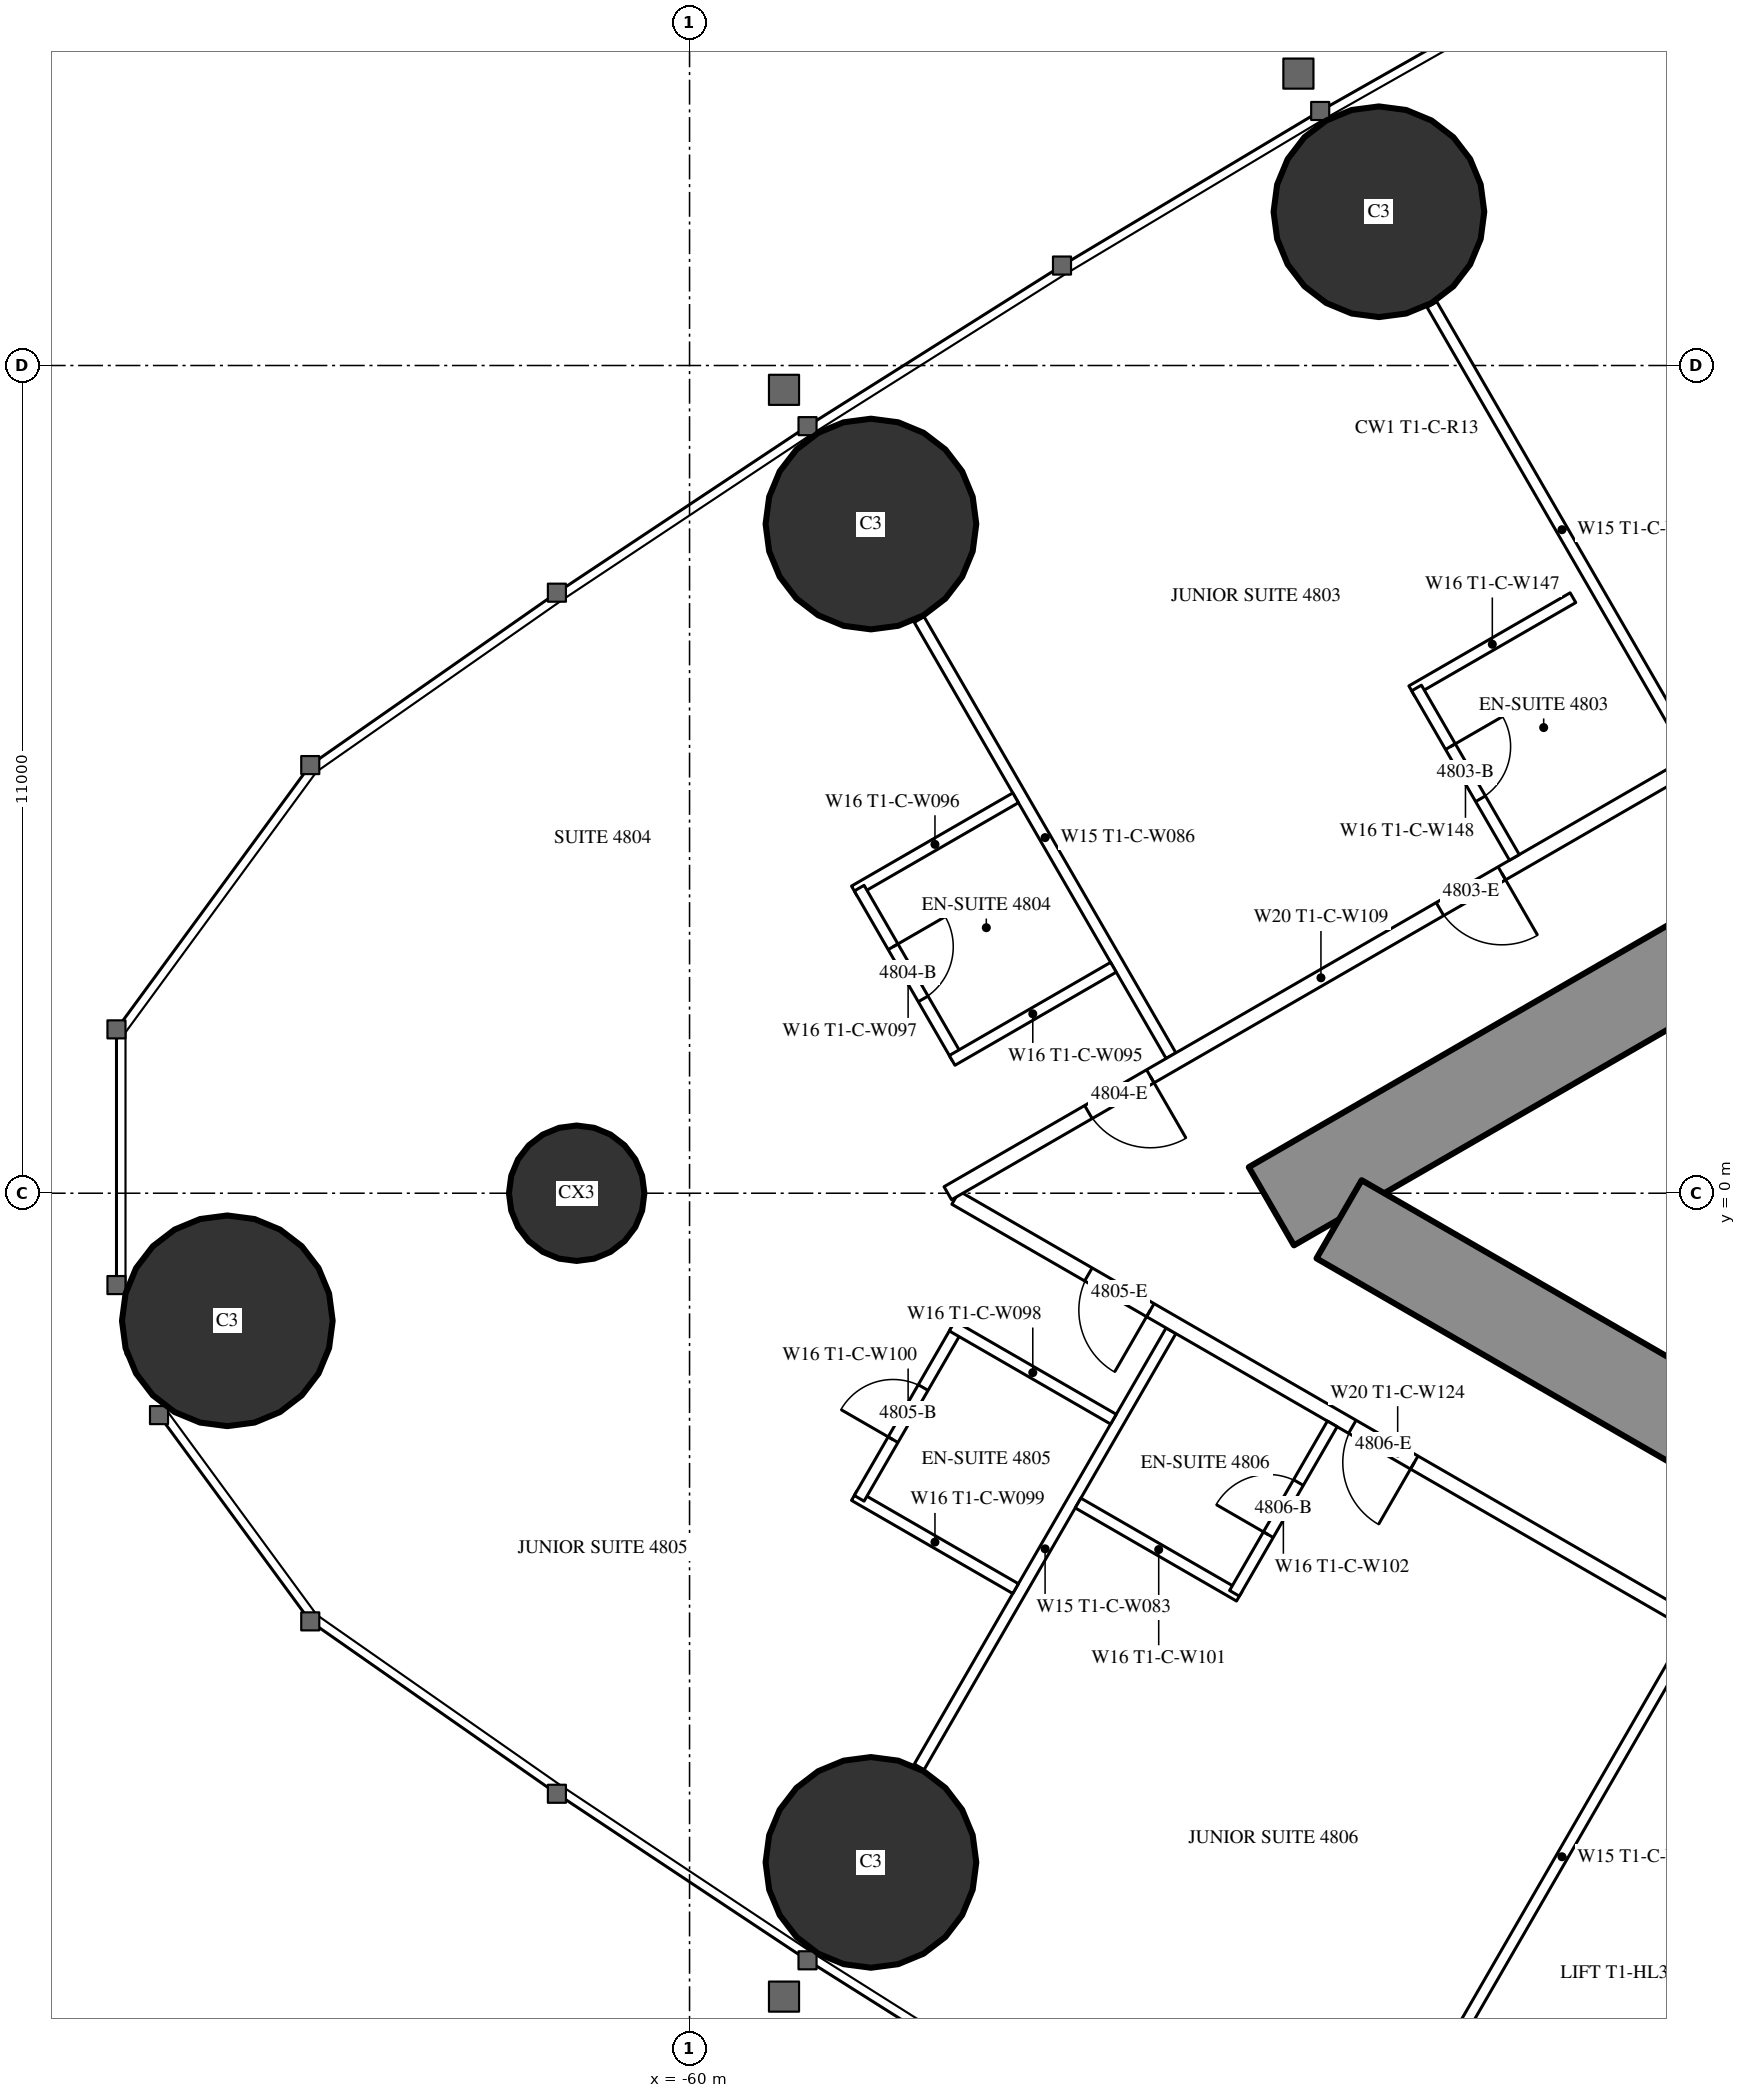
"""IFC4 building model, lengths in metres.
Left out: names, types, materials, properties, quantities, classifications, styles, units other than length and angle.
Written with IfcOpenShell. Run it as: python <this file> out.ifc"""

import sys

from ifc_helpers import new_model, si_unit, direction, frame, frame_2d, origin, origin_2d, place, context, subcontext, project, spatial, rectangle, circle, extrude, element, fill, save


model = new_model("IFC4")
c1 = context("Model", 3, precision=1e-05, world=origin(), true_north=direction((0.0, 1.0)))
c2 = subcontext(c1, "Body", "Model", "MODEL_VIEW")
j1 = project(units=[si_unit("LENGTHUNIT", "METRE"), si_unit("PLANEANGLEUNIT", "RADIAN")], contexts=[c1])
p1 = place(None, origin())
s1 = spatial("IfcSite", under=j1, at=p1, CompositionType="ELEMENT")
p2 = place(p1, origin())
s2 = spatial("IfcBuilding", under=s1, at=p2, CompositionType="ELEMENT")
p3 = place(p2, frame((0.0, 0.0, 180.8)))
s3 = spatial("IfcBuildingStorey", under=s2, at=p3, CompositionType="ELEMENT", Elevation=180.8)
for number, where, z_axis, x_axis in (
    (1, (-66.143, -1.695, 0.0), (0.0, 0.0, 1.0), (1.0, 0.0, 0.0)),
    (2, (-57.59, -8.893, 0.0), (0.0, 0.0, 1.0), (1.0, 0.0, 0.0)),
    (3, (-50.839, 13.043, 0.0), (0.0, 0.0, 1.0), (1.0, 0.0, 0.0)),
    (4, (-57.59, 8.893, 0.0), (0.0, 0.0, 1.0), (1.0, 0.0, 0.0)),
):
    element("IfcColumn", number, at=place(p3, frame(where, z_axis=z_axis, x_axis=x_axis)), inside=s3, PredefinedType="COLUMN", context=c2, shape_type="SweptSolid", body=[
        extrude(circle(Radius=1.4, at=origin_2d()), origin(), (0.0, 0.0, 1.0), 3.5),
    ])
p4 = place(p3, frame((-61.5, 0.0, 0.0), z_axis=(0.0, 0.0, 1.0), x_axis=(1.0, 0.0, 0.0)))
e5 = element("IfcColumn", 5, at=p4, inside=s3, PredefinedType="COLUMN", context=c2, shape_type="SweptSolid", body=[
    extrude(circle(Radius=0.9, at=origin_2d()), origin(), (0.0, 0.0, 1.0), 3.5),
])
p5 = place(p3, frame((-27.2, 14.3, 0.0), z_axis=(0.0, 0.0, 1.0), x_axis=(-0.866026593062, -0.499997940104, 0.0)))
e6 = element("IfcWall", 6, at=p5, inside=s3, PredefinedType="SHEAR", context=c2, shape_type="SweptSolid", body=[
    extrude(rectangle(XDim=28.946, YDim=1.2, at=frame_2d((14.473, 0.0))), origin(), (0.0, 0.0, 1.0), 3.5),
])
p6 = place(p5, frame((4.6, 0.0, 0.0)))
e7 = element("IfcOpeningElement", 7, at=p6, cuts=e6, PredefinedType="OPENING", context=c2, shape_type="SweptSolid", body=[
    extrude(rectangle(XDim=1.0, YDim=2.2, at=frame_2d((0.5, 1.1))), frame((0.0, 0.61, 0.0), z_axis=(0.0, -1.0, 0.0), x_axis=(1.0, 0.0, 0.0)), (0.0, 0.0, 1.0), 1.22),
])
p7 = place(p5, frame((13.395, 0.0, 0.0)))
e8 = element("IfcOpeningElement", 8, at=p7, cuts=e6, PredefinedType="OPENING", context=c2, shape_type="SweptSolid", body=[
    extrude(rectangle(XDim=1.8, YDim=2.2, at=frame_2d((0.9, 1.1))), frame((0.0, 0.61, 0.0), z_axis=(0.0, -1.0, 0.0), x_axis=(1.0, 0.0, 0.0)), (0.0, 0.0, 1.0), 1.22),
])
p8 = place(p3, frame((-27.2, -14.3, 0.0), z_axis=(0.0, 0.0, 1.0), x_axis=(-0.866024021859, 0.500002393557, 0.0)))
e9 = element("IfcWall", 9, at=p8, inside=s3, PredefinedType="SHEAR", context=c2, shape_type="SweptSolid", body=[
    extrude(rectangle(XDim=27.907, YDim=1.2, at=frame_2d((13.954, 0.0))), origin(), (0.0, 0.0, 1.0), 3.5),
])
p9 = place(p8, frame((4.6, 0.0, 0.0)))
e10 = element("IfcOpeningElement", 10, at=p9, cuts=e9, PredefinedType="OPENING", context=c2, shape_type="SweptSolid", body=[
    extrude(rectangle(XDim=1.0, YDim=2.2, at=frame_2d((0.5, 1.1))), frame((0.0, 0.61, 0.0), z_axis=(0.0, -1.0, 0.0), x_axis=(1.0, 0.0, 0.0)), (0.0, 0.0, 1.0), 1.22),
])
p10 = place(p8, frame((13.395, 0.0, 0.0)))
e11 = element("IfcOpeningElement", 11, at=p10, cuts=e9, PredefinedType="OPENING", context=c2, shape_type="SweptSolid", body=[
    extrude(rectangle(XDim=1.8, YDim=2.2, at=frame_2d((0.9, 1.1))), frame((0.0, 0.61, 0.0), z_axis=(0.0, -1.0, 0.0), x_axis=(1.0, 0.0, 0.0)), (0.0, 0.0, 1.0), 1.22),
])
p11 = place(p3, frame((-46.679, 5.825, 0.0), z_axis=(0.0, 0.0, 1.0), x_axis=(-0.500006839597, 0.866021454905, 0.0)))
e12 = element("IfcWall", 12, at=p11, inside=s3, PredefinedType="PARTITIONING", context=c2, shape_type="SweptSolid", body=[
    extrude(rectangle(XDim=6.911, YDim=0.15, at=frame_2d((3.456, 0.0))), origin(), (0.0, 0.0, 1.0), 2.3),
])
p12 = place(p3, frame((-53.602, 1.828, 0.0), z_axis=(0.0, 0.0, 1.0), x_axis=(-0.49999191814, 0.866030069798, 0.0)))
e13 = element("IfcWall", 13, at=p12, inside=s3, PredefinedType="PARTITIONING", context=c2, shape_type="SweptSolid", body=[
    extrude(rectangle(XDim=6.692, YDim=0.15, at=frame_2d((3.346, 0.0))), origin(), (0.0, 0.0, 1.0), 2.3),
])
p13 = place(p3, frame((-46.679, -5.825, 0.0), z_axis=(0.0, 0.0, 1.0), x_axis=(-0.500006839597, -0.866021454905, 0.0)))
e14 = element("IfcWall", 14, at=p13, inside=s3, PredefinedType="PARTITIONING", context=c2, shape_type="SweptSolid", body=[
    extrude(rectangle(XDim=6.911, YDim=0.15, at=frame_2d((3.456, 0.0))), origin(), (0.0, 0.0, 1.0), 2.3),
])
p14 = place(p3, frame((-53.602, -1.828, 0.0), z_axis=(0.0, 0.0, 1.0), x_axis=(-0.49999191814, -0.866030069798, 0.0)))
e15 = element("IfcWall", 15, at=p14, inside=s3, PredefinedType="PARTITIONING", context=c2, shape_type="SweptSolid", body=[
    extrude(rectangle(XDim=6.692, YDim=0.15, at=frame_2d((3.346, 0.0))), origin(), (0.0, 0.0, 1.0), 2.3),
])
p15 = place(p3, frame((-44.715, -6.844, 0.0), z_axis=(0.0, 0.0, 1.0), x_axis=(-0.866025261224, 0.500000246922, 0.0)))
e16 = element("IfcWall", 16, at=p15, inside=s3, PredefinedType="PARTITIONING", context=c2, shape_type="SweptSolid", body=[
    extrude(rectangle(XDim=13.567, YDim=0.2, at=frame_2d((6.783, 0.0))), origin(), (0.0, 0.0, 1.0), 3.25),
])
p16 = place(p15, frame((10.579, 0.0, 0.0)))
e17 = element("IfcOpeningElement", 17, at=p16, cuts=e16, PredefinedType="OPENING", context=c2, shape_type="SweptSolid", body=[
    extrude(rectangle(XDim=0.95, YDim=2.2, at=frame_2d((0.475, 1.1))), frame((0.0, 0.11, 0.0), z_axis=(0.0, -1.0, 0.0), x_axis=(1.0, 0.0, 0.0)), (0.0, 0.0, 1.0), 0.22),
])
p17 = place(p15, frame((6.529, 0.0, 0.0)))
e18 = element("IfcOpeningElement", 18, at=p17, cuts=e16, PredefinedType="OPENING", context=c2, shape_type="SweptSolid", body=[
    extrude(rectangle(XDim=0.95, YDim=2.2, at=frame_2d((0.475, 1.1))), frame((0.0, 0.11, 0.0), z_axis=(0.0, -1.0, 0.0), x_axis=(1.0, 0.0, 0.0)), (0.0, 0.0, 1.0), 0.22),
])
p18 = place(p15, frame((0.5, 0.0, 0.0)))
e19 = element("IfcOpeningElement", 19, at=p18, cuts=e16, PredefinedType="OPENING", context=c2, shape_type="SweptSolid", body=[
    extrude(rectangle(XDim=1.435, YDim=2.2, at=frame_2d((0.718, 1.1))), frame((0.0, 0.11, 0.0), z_axis=(0.0, -1.0, 0.0), x_axis=(1.0, 0.0, 0.0)), (0.0, 0.0, 1.0), 0.22),
])
p19 = place(p3, frame((-46.65, 5.726, 0.0), z_axis=(0.0, 0.0, 1.0), x_axis=(-0.866027963864, -0.499995565786, 0.0)))
e20 = element("IfcWall", 20, at=p19, inside=s3, PredefinedType="PARTITIONING", context=c2, shape_type="SweptSolid", body=[
    extrude(rectangle(XDim=11.452, YDim=0.2, at=frame_2d((5.726, 0.0))), origin(), (0.0, 0.0, 1.0), 3.25),
])
p20 = place(p19, frame((2.95, 0.0, 0.0)))
e21 = element("IfcOpeningElement", 21, at=p20, cuts=e20, PredefinedType="OPENING", context=c2, shape_type="SweptSolid", body=[
    extrude(rectangle(XDim=0.95, YDim=2.2, at=frame_2d((0.475, 1.1))), frame((0.0, 0.11, 0.0), z_axis=(0.0, -1.0, 0.0), x_axis=(1.0, 0.0, 0.0)), (0.0, 0.0, 1.0), 0.22),
])
p21 = place(p19, frame((8.344, 0.0, 0.0)))
e22 = element("IfcOpeningElement", 22, at=p21, cuts=e20, PredefinedType="OPENING", context=c2, shape_type="SweptSolid", body=[
    extrude(rectangle(XDim=0.95, YDim=2.2, at=frame_2d((0.475, 1.1))), frame((0.0, 0.11, 0.0), z_axis=(0.0, -1.0, 0.0), x_axis=(1.0, 0.0, 0.0)), (0.0, 0.0, 1.0), 0.22),
])
p22 = place(p3, frame((-48.26, 7.914, 0.0), z_axis=(0.0, 0.0, 1.0), x_axis=(-0.866031185235, -0.4999899861, 0.0)))
e23 = element("IfcWall", 23, at=p22, inside=s3, PredefinedType="PARTITIONING", context=c2, shape_type="SweptSolid", body=[
    extrude(rectangle(XDim=2.475, YDim=0.15, at=frame_2d((1.238, 0.0))), origin(), (0.0, 0.0, 1.0), 3.25),
])
p23 = place(p3, frame((-49.039, 4.463, 0.0), z_axis=(0.0, 0.0, 1.0), x_axis=(-0.499936506574, 0.866062058628, 0.0)))
e24 = element("IfcWall", 24, at=p23, inside=s3, PredefinedType="PARTITIONING", context=c2, shape_type="SweptSolid", body=[
    extrude(rectangle(XDim=2.6, YDim=0.15, at=frame_2d((1.3, 0.0))), origin(), (0.0, 0.0, 1.0), 3.25),
])
p24 = place(p23, frame((0.9, 0.0, 0.0)))
e25 = element("IfcOpeningElement", 25, at=p24, cuts=e24, PredefinedType="OPENING", context=c2, shape_type="SweptSolid", body=[
    extrude(rectangle(XDim=0.8, YDim=2.2, at=frame_2d((0.4, 1.1))), frame((0.0, 0.085, 0.0), z_axis=(0.0, -1.0, 0.0), x_axis=(1.0, 0.0, 0.0)), (0.0, 0.0, 1.0), 0.17),
])
p25 = place(p3, frame((-55.667, 5.255, 0.0), z_axis=(0.0, 0.0, 1.0), x_axis=(-0.866006523861, -0.500032699561, 0.0)))
e26 = element("IfcWall", 26, at=p25, inside=s3, PredefinedType="PARTITIONING", context=c2, shape_type="SweptSolid", body=[
    extrude(rectangle(XDim=2.475, YDim=0.15, at=frame_2d((1.237, 0.0))), origin(), (0.0, 0.0, 1.0), 3.25),
])
p26 = place(p3, frame((-56.446, 1.803, 0.0), z_axis=(0.0, 0.0, 1.0), x_axis=(-0.499936506574, 0.866062058628, 0.0)))
e27 = element("IfcWall", 27, at=p26, inside=s3, PredefinedType="PARTITIONING", context=c2, shape_type="SweptSolid", body=[
    extrude(rectangle(XDim=2.6, YDim=0.15, at=frame_2d((1.3, 0.0))), origin(), (0.0, 0.0, 1.0), 3.25),
])
p27 = place(p26, frame((0.9, 0.0, 0.0)))
e28 = element("IfcOpeningElement", 28, at=p27, cuts=e27, PredefinedType="OPENING", context=c2, shape_type="SweptSolid", body=[
    extrude(rectangle(XDim=0.8, YDim=2.2, at=frame_2d((0.4, 1.1))), frame((0.0, 0.085, 0.0), z_axis=(0.0, -1.0, 0.0), x_axis=(1.0, 0.0, 0.0)), (0.0, 0.0, 1.0), 0.17),
])
p28 = place(p3, frame((-54.367, 3.003, 0.0), z_axis=(0.0, 0.0, 1.0), x_axis=(-0.866031185235, -0.4999899861, 0.0)))
e29 = element("IfcWall", 29, at=p28, inside=s3, PredefinedType="PARTITIONING", context=c2, shape_type="SweptSolid", body=[
    extrude(rectangle(XDim=2.475, YDim=0.15, at=frame_2d((1.238, 0.0))), origin(), (0.0, 0.0, 1.0), 3.25),
])
p29 = place(p3, frame((-55.667, -5.255, 0.0), z_axis=(0.0, 0.0, 1.0), x_axis=(-0.866006523861, 0.500032699561, 0.0)))
e30 = element("IfcWall", 30, at=p29, inside=s3, PredefinedType="PARTITIONING", context=c2, shape_type="SweptSolid", body=[
    extrude(rectangle(XDim=2.475, YDim=0.15, at=frame_2d((1.237, 0.0))), origin(), (0.0, 0.0, 1.0), 3.25),
])
p30 = place(p3, frame((-56.446, -1.803, 0.0), z_axis=(0.0, 0.0, 1.0), x_axis=(-0.499936506574, -0.866062058628, 0.0)))
e31 = element("IfcWall", 31, at=p30, inside=s3, PredefinedType="PARTITIONING", context=c2, shape_type="SweptSolid", body=[
    extrude(rectangle(XDim=2.6, YDim=0.15, at=frame_2d((1.3, 0.0))), origin(), (0.0, 0.0, 1.0), 3.25),
])
p31 = place(p30, frame((0.9, 0.0, 0.0)))
e32 = element("IfcOpeningElement", 32, at=p31, cuts=e31, PredefinedType="OPENING", context=c2, shape_type="SweptSolid", body=[
    extrude(rectangle(XDim=0.8, YDim=2.2, at=frame_2d((0.4, 1.1))), frame((0.0, 0.085, 0.0), z_axis=(0.0, -1.0, 0.0), x_axis=(1.0, 0.0, 0.0)), (0.0, 0.0, 1.0), 0.17),
])
for number, where, z_axis, x_axis in (
    (33, (-54.367, -3.003, 0.0), (0.0, 0.0, 1.0), (-0.866, 0.5, 0.0)),
    (34, (-52.694, -5.355, 0.0), (0.0, 0.0, 1.0), (-0.866, 0.5, 0.0)),
):
    element("IfcWall", number, at=place(p3, frame(where, z_axis=z_axis, x_axis=x_axis)), inside=s3, PredefinedType="PARTITIONING", context=c2, shape_type="SweptSolid", body=[
        extrude(rectangle(XDim=2.475, YDim=0.15, at=frame_2d((1.238, 0.0))), origin(), (0.0, 0.0, 1.0), 3.25),
    ])
p32 = place(p3, frame((-51.459, -3.065, 0.0), z_axis=(0.0, 0.0, 1.0), x_axis=(-0.499936506574, -0.866062058628, 0.0)))
e35 = element("IfcWall", 35, at=p32, inside=s3, PredefinedType="PARTITIONING", context=c2, shape_type="SweptSolid", body=[
    extrude(rectangle(XDim=2.6, YDim=0.15, at=frame_2d((1.3, 0.0))), origin(), (0.0, 0.0, 1.0), 3.25),
])
p33 = place(p32, frame((0.9, 0.0, 0.0)))
e36 = element("IfcOpeningElement", 36, at=p33, cuts=e35, PredefinedType="OPENING", context=c2, shape_type="SweptSolid", body=[
    extrude(rectangle(XDim=0.8, YDim=2.2, at=frame_2d((0.4, 1.1))), frame((0.0, 0.085, 0.0), z_axis=(0.0, -1.0, 0.0), x_axis=(1.0, 0.0, 0.0)), (0.0, 0.0, 1.0), 0.17),
])
p34 = place(p3, frame((-45.428, -8.568, 0.0), z_axis=(0.0, 0.0, 1.0), x_axis=(-0.499929347863, -0.866066190972, 0.0)))
e37 = element("IfcWall", 37, at=p34, inside=s3, PredefinedType="PARTITIONING", context=c2, shape_type="SweptSolid", body=[
    extrude(rectangle(XDim=3.201, YDim=0.25, at=frame_2d((1.6, 0.0))), origin(), (0.0, 0.0, 1.0), 3.25),
])
p35 = place(p24, origin())
e38 = element("IfcDoor", 38, at=p35, inside=s3, OperationType="SINGLE_SWING_RIGHT", PredefinedType="DOOR", context=c2, shape_type="SweptSolid", body=[
    extrude(rectangle(XDim=0.8, YDim=2.2, at=frame_2d((0.4, 1.1))), frame((0.0, 0.025, 0.0), z_axis=(0.0, -1.0, 0.0), x_axis=(1.0, 0.0, 0.0)), (0.0, 0.0, 1.0), 0.05),
])
fill(e25, e38)
p36 = place(p20, origin())
e39 = element("IfcDoor", 39, at=p36, inside=s3, OperationType="SINGLE_SWING_LEFT", PredefinedType="DOOR", context=c2, shape_type="SweptSolid", body=[
    extrude(rectangle(XDim=0.95, YDim=2.2, at=frame_2d((0.475, 1.1))), frame((0.0, 0.025, 0.0), z_axis=(0.0, -1.0, 0.0), x_axis=(1.0, 0.0, 0.0)), (0.0, 0.0, 1.0), 0.05),
])
fill(e21, e39)
p37 = place(p27, origin())
e40 = element("IfcDoor", 40, at=p37, inside=s3, OperationType="SINGLE_SWING_RIGHT", PredefinedType="DOOR", context=c2, shape_type="SweptSolid", body=[
    extrude(rectangle(XDim=0.8, YDim=2.2, at=frame_2d((0.4, 1.1))), frame((0.0, 0.025, 0.0), z_axis=(0.0, -1.0, 0.0), x_axis=(1.0, 0.0, 0.0)), (0.0, 0.0, 1.0), 0.05),
])
fill(e28, e40)
p38 = place(p21, origin())
e41 = element("IfcDoor", 41, at=p38, inside=s3, OperationType="SINGLE_SWING_LEFT", PredefinedType="DOOR", context=c2, shape_type="SweptSolid", body=[
    extrude(rectangle(XDim=0.95, YDim=2.2, at=frame_2d((0.475, 1.1))), frame((0.0, 0.025, 0.0), z_axis=(0.0, -1.0, 0.0), x_axis=(1.0, 0.0, 0.0)), (0.0, 0.0, 1.0), 0.05),
])
fill(e22, e41)
p39 = place(p31, origin())
e42 = element("IfcDoor", 42, at=p39, inside=s3, OperationType="SINGLE_SWING_RIGHT", PredefinedType="DOOR", context=c2, shape_type="SweptSolid", body=[
    extrude(rectangle(XDim=0.8, YDim=2.2, at=frame_2d((0.4, 1.1))), frame((0.0, 0.025, 0.0), z_axis=(0.0, -1.0, 0.0), x_axis=(1.0, 0.0, 0.0)), (0.0, 0.0, 1.0), 0.05),
])
fill(e32, e42)
p40 = place(p16, origin())
e43 = element("IfcDoor", 43, at=p40, inside=s3, OperationType="SINGLE_SWING_LEFT", PredefinedType="DOOR", context=c2, shape_type="SweptSolid", body=[
    extrude(rectangle(XDim=0.95, YDim=2.2, at=frame_2d((0.475, 1.1))), frame((0.0, 0.025, 0.0), z_axis=(0.0, -1.0, 0.0), x_axis=(1.0, 0.0, 0.0)), (0.0, 0.0, 1.0), 0.05),
])
fill(e17, e43)
p41 = place(p33, origin())
e44 = element("IfcDoor", 44, at=p41, inside=s3, OperationType="SINGLE_SWING_RIGHT", PredefinedType="DOOR", context=c2, shape_type="SweptSolid", body=[
    extrude(rectangle(XDim=0.8, YDim=2.2, at=frame_2d((0.4, 1.1))), frame((0.0, 0.025, 0.0), z_axis=(0.0, -1.0, 0.0), x_axis=(1.0, 0.0, 0.0)), (0.0, 0.0, 1.0), 0.05),
])
fill(e36, e44)
p42 = place(p17, origin())
e45 = element("IfcDoor", 45, at=p42, inside=s3, OperationType="SINGLE_SWING_LEFT", PredefinedType="DOOR", context=c2, shape_type="SweptSolid", body=[
    extrude(rectangle(XDim=0.95, YDim=2.2, at=frame_2d((0.475, 1.1))), frame((0.0, 0.025, 0.0), z_axis=(0.0, -1.0, 0.0), x_axis=(1.0, 0.0, 0.0)), (0.0, 0.0, 1.0), 0.05),
])
fill(e18, e45)
save(model, sys.argv[1])
